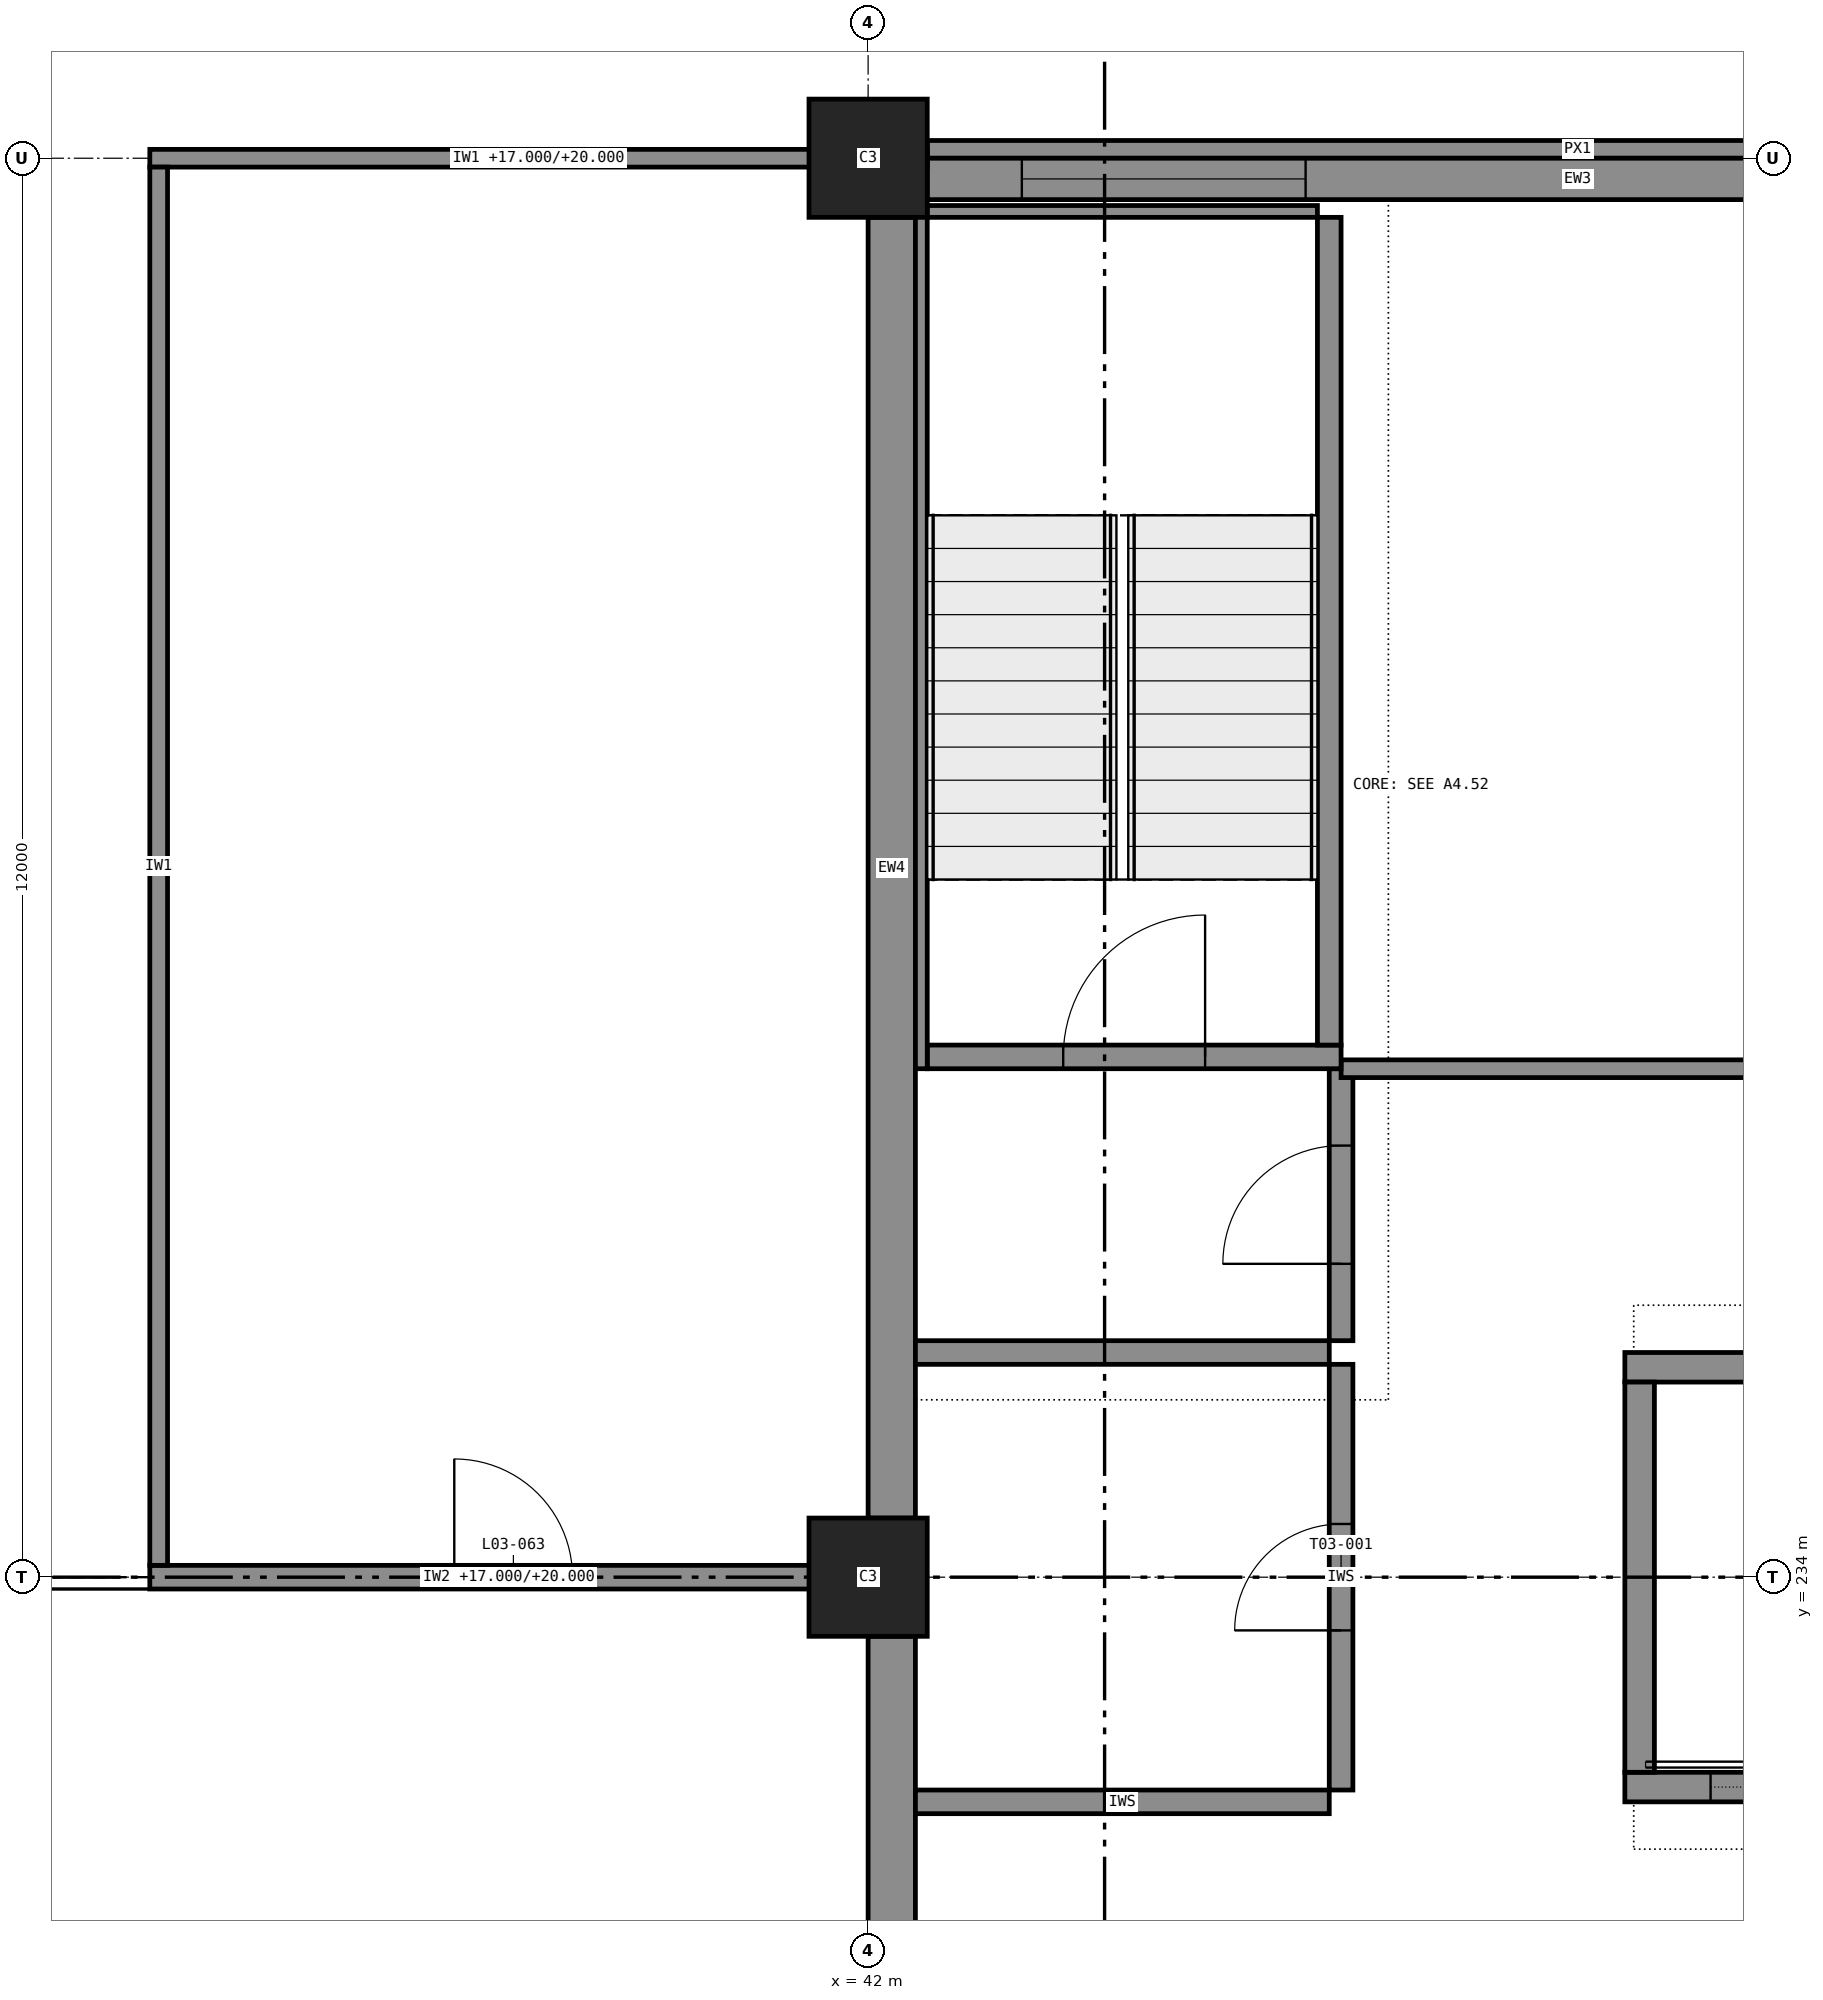
"""IFC4 building model, lengths in metres.
Left out: names, types, materials, properties, quantities, classifications, styles, units other than length and angle.
Written with IfcOpenShell. Run it as: python <this file> out.ifc"""

import sys

from ifc_helpers import new_model, si_unit, direction, frame, frame_2d, origin, origin_2d, place, context, subcontext, project, spatial, rectangle, extrude, element, fill, save


model = new_model("IFC4")
c1 = context("Model", 3, precision=1e-05, world=origin(), true_north=direction((0.0, 1.0)))
c2 = subcontext(c1, "Body", "Model", "MODEL_VIEW")
j1 = project(units=[si_unit("LENGTHUNIT", "METRE"), si_unit("PLANEANGLEUNIT", "RADIAN")], contexts=[c1])
p1 = place(None, origin())
s1 = spatial("IfcSite", under=j1, at=p1, CompositionType="ELEMENT")
p2 = place(p1, origin())
s2 = spatial("IfcBuilding", under=s1, at=p2, CompositionType="ELEMENT")
p3 = place(p2, frame((0.0, 0.0, 17.0)))
s3 = spatial("IfcBuildingStorey", under=s2, at=p3, CompositionType="ELEMENT", Elevation=17.0)
for number, where, z_axis, x_axis in (
    (1, (42.0, 234.0, 0.0), (0.0, 0.0, 1.0), (1.0, 0.0, 0.0)),
    (2, (42.0, 246.0, 0.0), (0.0, 0.0, 1.0), (1.0, 0.0, 0.0)),
):
    element("IfcColumn", number, at=place(p3, frame(where, z_axis=z_axis, x_axis=x_axis)), inside=s3, PredefinedType="COLUMN", context=c2, shape_type="SweptSolid", body=[
        extrude(rectangle(XDim=1.0, YDim=1.0, at=origin_2d()), origin(), (0.0, 0.0, 1.0), 4.0),
    ])
p4 = place(p3, frame((48.4, 232.225, 0.0), z_axis=(0.0, 0.0, 1.0), x_axis=(1.0, 0.0, 0.0)))
e3 = element("IfcWall", 3, at=p4, inside=s3, PredefinedType="SHEAR", context=c2, shape_type="SweptSolid", body=[
    extrude(rectangle(XDim=2.55, YDim=0.25, at=frame_2d((1.275, 0.0))), origin(), (0.0, 0.0, 1.0), 4.0),
])
p5 = place(p4, frame((0.725, 0.0, 0.0)))
e4 = element("IfcOpeningElement", 4, at=p5, cuts=e3, PredefinedType="OPENING", context=c2, shape_type="SweptSolid", body=[
    extrude(rectangle(XDim=1.1, YDim=2.1, at=frame_2d((0.55, 1.05))), frame((0.0, 0.135, 0.0), z_axis=(0.0, -1.0, 0.0), x_axis=(1.0, 0.0, 0.0)), (0.0, 0.0, 1.0), 0.27),
])
p6 = place(p3, frame((48.4, 235.775, 0.0), z_axis=(0.0, 0.0, 1.0), x_axis=(1.0, 0.0, 0.0)))
e5 = element("IfcWall", 5, at=p6, inside=s3, PredefinedType="SHEAR", context=c2, shape_type="SweptSolid", body=[
    extrude(rectangle(XDim=2.55, YDim=0.25, at=frame_2d((1.275, 0.0))), origin(), (0.0, 0.0, 1.0), 4.0),
])
p7 = place(p3, frame((48.525, 232.35, 0.0), z_axis=(0.0, 0.0, 1.0), x_axis=(0.0, 1.0, 0.0)))
e6 = element("IfcWall", 6, at=p7, inside=s3, PredefinedType="SHEAR", context=c2, shape_type="SweptSolid", body=[
    extrude(rectangle(XDim=3.3, YDim=0.25, at=frame_2d((1.65, 0.0))), origin(), (0.0, 0.0, 1.0), 4.0),
])
p8 = place(p3, frame((42.5, 238.4, 0.0), z_axis=(0.0, 0.0, 1.0), x_axis=(1.0, 0.0, 0.0)))
e7 = element("IfcWall", 7, at=p8, inside=s3, PredefinedType="SHEAR", context=c2, shape_type="SweptSolid", body=[
    extrude(rectangle(XDim=3.5, YDim=0.2, at=frame_2d((1.75, 0.0))), origin(), (0.0, 0.0, 1.0), 4.0),
])
p9 = place(p8, frame((1.15, 0.0, 0.0)))
e8 = element("IfcOpeningElement", 8, at=p9, cuts=e7, PredefinedType="OPENING", context=c2, shape_type="SweptSolid", body=[
    extrude(rectangle(XDim=1.2, YDim=2.1, at=frame_2d((0.6, 1.05))), frame((0.0, 0.11, 0.0), z_axis=(0.0, -1.0, 0.0), x_axis=(1.0, 0.0, 0.0)), (0.0, 0.0, 1.0), 0.22),
])
p10 = place(p3, frame((45.9, 238.5, 0.0), z_axis=(0.0, 0.0, 1.0), x_axis=(0.0, 1.0, 0.0)))
e9 = element("IfcWall", 9, at=p10, inside=s3, PredefinedType="SHEAR", context=c2, shape_type="SweptSolid", body=[
    extrude(rectangle(XDim=7.0, YDim=0.2, at=frame_2d((3.5, 0.0))), origin(), (0.0, 0.0, 1.0), 4.0),
])
p11 = place(p3, frame((42.45, 238.3, 0.0), z_axis=(0.0, 0.0, 1.0), x_axis=(0.0, 1.0, 0.0)))
e10 = element("IfcWall", 10, at=p11, inside=s3, PredefinedType="SHEAR", context=c2, shape_type="SweptSolid", body=[
    extrude(rectangle(XDim=7.3, YDim=0.1, at=frame_2d((3.65, 0.0))), origin(), (0.0, 0.0, 1.0), 3.8),
])
p12 = place(p3, frame((42.5, 245.55, 0.0), z_axis=(0.0, 0.0, 1.0), x_axis=(1.0, 0.0, 0.0)))
e11 = element("IfcWall", 11, at=p12, inside=s3, PredefinedType="SHEAR", context=c2, shape_type="SweptSolid", body=[
    extrude(rectangle(XDim=3.3, YDim=0.1, at=frame_2d((1.65, 0.0))), origin(), (0.0, 0.0, 1.0), 3.8),
])
p13 = place(p3, frame((53.5, 245.825, 0.0), z_axis=(0.0, 0.0, 1.0), x_axis=(-1.0, 0.0, 0.0)))
e12 = element("IfcWall", 12, at=p13, inside=s3, PredefinedType="STANDARD", context=c2, shape_type="SweptSolid", body=[
    extrude(rectangle(XDim=11.0, YDim=0.35, at=frame_2d((5.5, 0.0))), origin(), (0.0, 0.0, 1.0), 3.0),
])
p14 = place(p13, frame((1.3, 0.0, 0.6)))
e13 = element("IfcOpeningElement", 13, at=p14, cuts=e12, PredefinedType="OPENING", context=c2, shape_type="SweptSolid", body=[
    extrude(rectangle(XDim=2.4, YDim=2.4, at=frame_2d((1.2, 1.2))), frame((0.0, 0.185, 0.0), z_axis=(0.0, -1.0, 0.0), x_axis=(1.0, 0.0, 0.0)), (0.0, 0.0, 1.0), 0.37),
])
p15 = place(p13, frame((7.8, 0.0, 0.6)))
e14 = element("IfcOpeningElement", 14, at=p15, cuts=e12, PredefinedType="OPENING", context=c2, shape_type="SweptSolid", body=[
    extrude(rectangle(XDim=2.4, YDim=2.4, at=frame_2d((1.2, 1.2))), frame((0.0, 0.185, 0.0), z_axis=(0.0, -1.0, 0.0), x_axis=(1.0, 0.0, 0.0)), (0.0, 0.0, 1.0), 0.37),
])
p16 = place(p3, frame((53.5, 246.075, 3.8), z_axis=(0.0, 0.0, 1.0), x_axis=(-1.0, 0.0, 0.0)))
e15 = element("IfcWall", 15, at=p16, inside=s3, PredefinedType="STANDARD", context=c2, shape_type="SweptSolid", body=[
    extrude(rectangle(XDim=11.0, YDim=0.15, at=frame_2d((5.5, 0.0))), origin(), (0.0, 0.0, 1.0), 0.2),
])
for number, where, z_axis, x_axis in (
    (16, (42.2, 245.5, 0.0), (0.0, 0.0, 1.0), (0.0, -1.0, 0.0)),
    (17, (42.2, 233.5, 0.0), (0.0, 0.0, 1.0), (0.0, -1.0, 0.0)),
):
    element("IfcWall", number, at=place(p3, frame(where, z_axis=z_axis, x_axis=x_axis)), inside=s3, PredefinedType="SOLIDWALL", context=c2, shape_type="SweptSolid", body=[
        extrude(rectangle(XDim=11.0, YDim=0.4, at=frame_2d((5.5, 0.0))), origin(), (0.0, 0.0, 1.0), 3.0),
    ])
p17 = place(p3, frame((35.925, 234.0, 0.0), z_axis=(0.0, 0.0, 1.0), x_axis=(1.0, 0.0, 0.0)))
e18 = element("IfcWall", 18, at=p17, inside=s3, PredefinedType="PARTITIONING", context=c2, shape_type="SweptSolid", body=[
    extrude(rectangle(XDim=6.075, YDim=0.2, at=frame_2d((3.038, 0.0))), origin(), (0.0, 0.0, 1.0), 3.0),
])
p18 = place(p17, frame((2.575, 0.0, 0.0)))
e19 = element("IfcOpeningElement", 19, at=p18, cuts=e18, PredefinedType="OPENING", context=c2, shape_type="SweptSolid", body=[
    extrude(rectangle(XDim=1.0, YDim=2.1, at=frame_2d((0.5, 1.05))), frame((0.0, 0.11, 0.0), z_axis=(0.0, -1.0, 0.0), x_axis=(1.0, 0.0, 0.0)), (0.0, 0.0, 1.0), 0.22),
])
p19 = place(p3, frame((35.925, 246.0, 0.0), z_axis=(0.0, 0.0, 1.0), x_axis=(1.0, 0.0, 0.0)))
e20 = element("IfcWall", 20, at=p19, inside=s3, PredefinedType="PARTITIONING", context=c2, shape_type="SweptSolid", body=[
    extrude(rectangle(XDim=6.575, YDim=0.15, at=frame_2d((3.288, 0.0))), origin(), (0.0, 0.0, 1.0), 3.0),
])
p20 = place(p3, frame((36.0, 234.1, 0.0), z_axis=(0.0, 0.0, 1.0), x_axis=(0.0, 1.0, 0.0)))
e21 = element("IfcWall", 21, at=p20, inside=s3, PredefinedType="PARTITIONING", context=c2, shape_type="SweptSolid", body=[
    extrude(rectangle(XDim=11.825, YDim=0.15, at=frame_2d((5.913, 0.0))), origin(), (0.0, 0.0, 1.0), 3.8),
])
for number, where, z_axis, x_axis in (
    (22, (42.4, 232.1, 0.0), (0.0, 0.0, 1.0), (1.0, 0.0, 0.0)),
    (23, (42.4, 235.9, 0.0), (0.0, 0.0, 1.0), (1.0, 0.0, 0.0)),
):
    element("IfcWall", number, at=place(p3, frame(where, z_axis=z_axis, x_axis=x_axis)), inside=s3, PredefinedType="PARTITIONING", context=c2, shape_type="SweptSolid", body=[
        extrude(rectangle(XDim=3.5, YDim=0.2, at=frame_2d((1.75, 0.0))), origin(), (0.0, 0.0, 1.0), 3.8),
    ])
p21 = place(p3, frame((46.0, 232.2, 0.0), z_axis=(0.0, 0.0, 1.0), x_axis=(0.0, 1.0, 0.0)))
e24 = element("IfcWall", 24, at=p21, inside=s3, PredefinedType="PARTITIONING", context=c2, shape_type="SweptSolid", body=[
    extrude(rectangle(XDim=3.6, YDim=0.2, at=frame_2d((1.8, 0.0))), origin(), (0.0, 0.0, 1.0), 3.8),
])
p22 = place(p21, frame((1.35, 0.0, 0.0)))
e25 = element("IfcOpeningElement", 25, at=p22, cuts=e24, PredefinedType="OPENING", context=c2, shape_type="SweptSolid", body=[
    extrude(rectangle(XDim=0.9, YDim=2.1, at=frame_2d((0.45, 1.05))), frame((0.0, 0.11, 0.0), z_axis=(0.0, -1.0, 0.0), x_axis=(1.0, 0.0, 0.0)), (0.0, 0.0, 1.0), 0.22),
])
p23 = place(p3, frame((46.0, 236.0, 0.0), z_axis=(0.0, 0.0, 1.0), x_axis=(0.0, 1.0, 0.0)))
e26 = element("IfcWall", 26, at=p23, inside=s3, PredefinedType="PARTITIONING", context=c2, shape_type="SweptSolid", body=[
    extrude(rectangle(XDim=2.3, YDim=0.2, at=frame_2d((1.15, 0.0))), origin(), (0.0, 0.0, 1.0), 3.8),
])
p24 = place(p23, frame((0.65, 0.0, 0.0)))
e27 = element("IfcOpeningElement", 27, at=p24, cuts=e26, PredefinedType="OPENING", context=c2, shape_type="SweptSolid", body=[
    extrude(rectangle(XDim=1.0, YDim=2.1, at=frame_2d((0.5, 1.05))), frame((0.0, 0.11, 0.0), z_axis=(0.0, -1.0, 0.0), x_axis=(1.0, 0.0, 0.0)), (0.0, 0.0, 1.0), 0.22),
])
p25 = place(p3, frame((46.0, 238.3, 0.0), z_axis=(0.0, 0.0, 1.0), x_axis=(1.0, 0.0, 0.0)))
e28 = element("IfcWall", 28, at=p25, inside=s3, PredefinedType="PARTITIONING", context=c2, shape_type="SweptSolid", body=[
    extrude(rectangle(XDim=16.1, YDim=0.15, at=frame_2d((8.05, 0.0))), origin(), (0.0, 0.0, 1.0), 3.8),
])
p26 = place(p25, frame((4.5, 0.0, 0.0)))
e29 = element("IfcOpeningElement", 29, at=p26, cuts=e28, PredefinedType="OPENING", context=c2, shape_type="SweptSolid", body=[
    extrude(rectangle(XDim=1.0, YDim=2.1, at=frame_2d((0.5, 1.05))), frame((0.0, 0.085, 0.0), z_axis=(0.0, -1.0, 0.0), x_axis=(1.0, 0.0, 0.0)), (0.0, 0.0, 1.0), 0.17),
])
p27 = place(p25, frame((11.5, 0.0, 0.0)))
e30 = element("IfcOpeningElement", 30, at=p27, cuts=e28, PredefinedType="OPENING", context=c2, shape_type="SweptSolid", body=[
    extrude(rectangle(XDim=1.0, YDim=2.1, at=frame_2d((0.5, 1.05))), frame((0.0, 0.085, 0.0), z_axis=(0.0, -1.0, 0.0), x_axis=(1.0, 0.0, 0.0)), (0.0, 0.0, 1.0), 0.17),
])
p28 = place(p15, origin())
e31 = element("IfcWindow", 31, at=p28, inside=s3, PartitioningType="SINGLE_PANEL", PredefinedType="WINDOW", context=c2, shape_type="SweptSolid", body=[
    extrude(rectangle(XDim=2.4, YDim=2.4, at=frame_2d((1.2, 1.2))), frame((0.0, 0.03, 0.0), z_axis=(0.0, -1.0, 0.0), x_axis=(1.0, 0.0, 0.0)), (0.0, 0.0, 1.0), 0.06),
])
fill(e14, e31)
p29 = place(p18, origin())
e32 = element("IfcDoor", 32, at=p29, inside=s3, OperationType="SINGLE_SWING_RIGHT", PredefinedType="DOOR", context=c2, shape_type="SweptSolid", body=[
    extrude(rectangle(XDim=1.0, YDim=2.1, at=frame_2d((0.5, 1.05))), frame((0.0, 0.025, 0.0), z_axis=(0.0, -1.0, 0.0), x_axis=(1.0, 0.0, 0.0)), (0.0, 0.0, 1.0), 0.05),
])
fill(e19, e32)
p30 = place(p22, origin())
e33 = element("IfcDoor", 33, at=p30, inside=s3, OperationType="SINGLE_SWING_LEFT", PredefinedType="DOOR", context=c2, shape_type="SweptSolid", body=[
    extrude(rectangle(XDim=0.9, YDim=2.1, at=frame_2d((0.45, 1.05))), frame((0.0, 0.025, 0.0), z_axis=(0.0, -1.0, 0.0), x_axis=(1.0, 0.0, 0.0)), (0.0, 0.0, 1.0), 0.05),
])
fill(e25, e33)
p31 = place(p24, origin())
e34 = element("IfcDoor", 34, at=p31, inside=s3, OperationType="SINGLE_SWING_LEFT", PredefinedType="DOOR", context=c2, shape_type="SweptSolid", body=[
    extrude(rectangle(XDim=1.0, YDim=2.1, at=frame_2d((0.5, 1.05))), frame((0.0, 0.025, 0.0), z_axis=(0.0, -1.0, 0.0), x_axis=(1.0, 0.0, 0.0)), (0.0, 0.0, 1.0), 0.05),
])
fill(e27, e34)
p32 = place(p5, origin())
e35 = element("IfcDoor", 35, at=p32, inside=s3, OperationType="SLIDING_TO_LEFT", PredefinedType="DOOR", context=c2, shape_type="SweptSolid", body=[
    extrude(rectangle(XDim=1.1, YDim=2.1, at=frame_2d((0.55, 1.05))), frame((0.0, 0.025, 0.0), z_axis=(0.0, -1.0, 0.0), x_axis=(1.0, 0.0, 0.0)), (0.0, 0.0, 1.0), 0.05),
])
fill(e4, e35)
p33 = place(p9, origin())
e36 = element("IfcDoor", 36, at=p33, inside=s3, OperationType="SINGLE_SWING_RIGHT", PredefinedType="DOOR", context=c2, shape_type="SweptSolid", body=[
    extrude(rectangle(XDim=1.2, YDim=2.1, at=frame_2d((0.6, 1.05))), frame((0.0, 0.025, 0.0), z_axis=(0.0, -1.0, 0.0), x_axis=(1.0, 0.0, 0.0)), (0.0, 0.0, 1.0), 0.05),
])
fill(e8, e36)
save(model, sys.argv[1])
